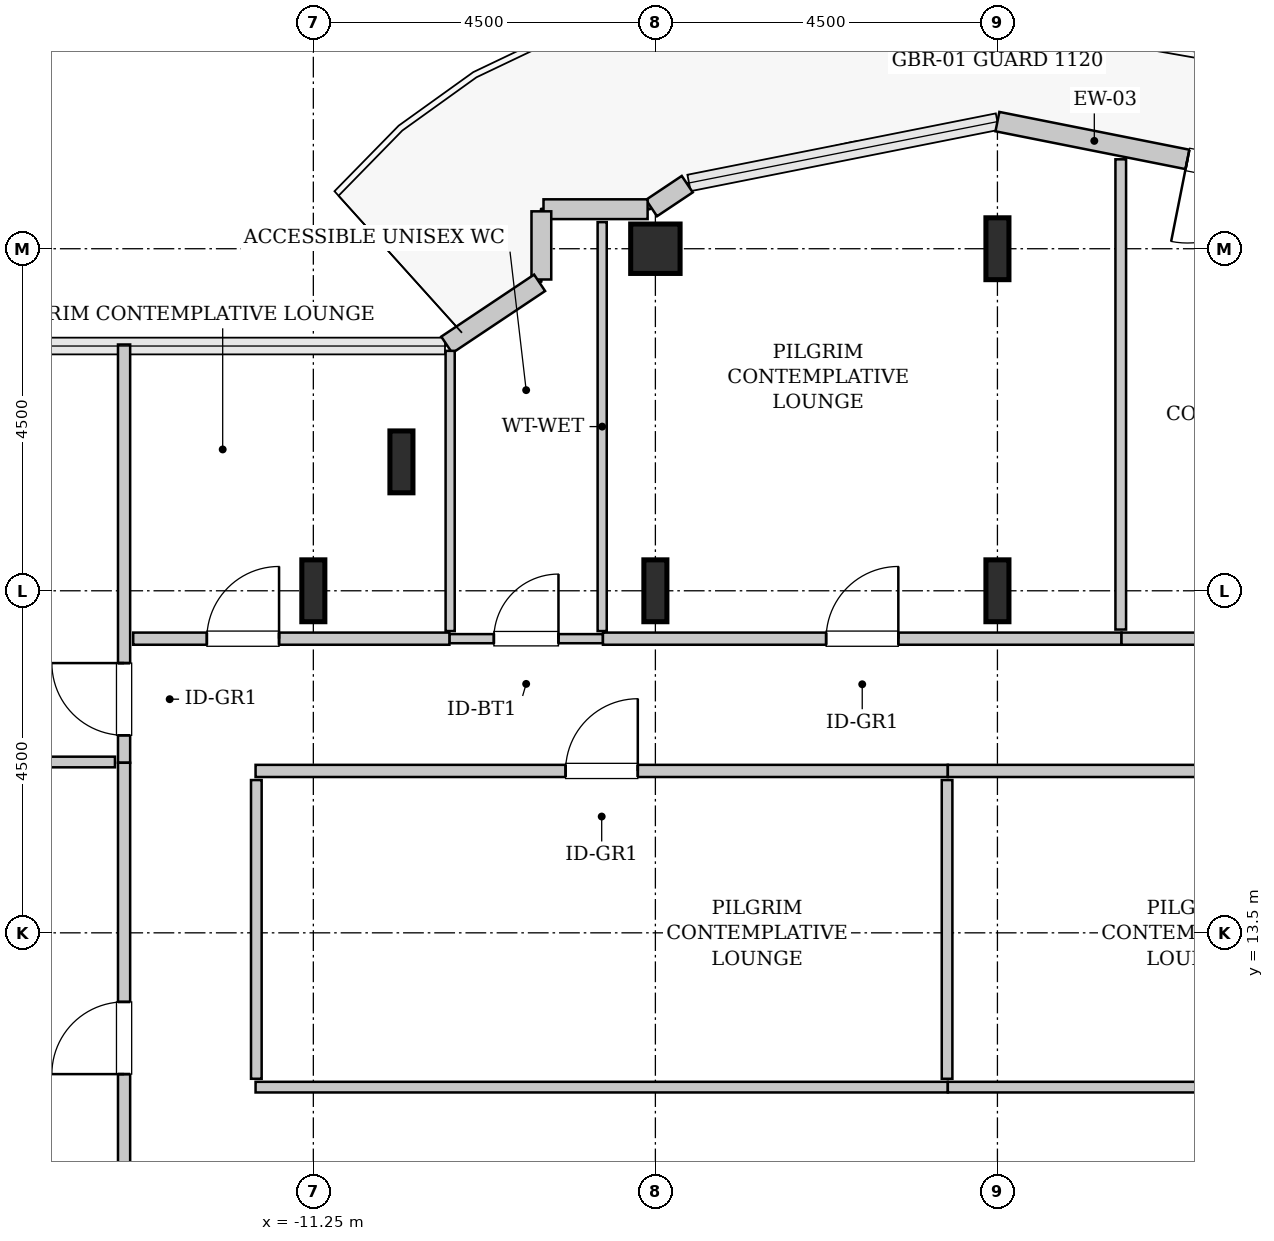
"""IFC4 building model, lengths in metres.
Left out: names, types, materials, properties, quantities, classifications, styles, units other than length and angle.
Written with IfcOpenShell. Run it as: python <this file> out.ifc"""

import sys

from ifc_helpers import new_model, si_unit, direction, frame, frame_2d, origin, origin_2d, place, context, subcontext, project, spatial, rectangle, hollow_rectangle, i_section, extrude, source, transform, mapped, element, fill, save


model = new_model("IFC4")
c1 = context("Model", 3, precision=1e-05, world=origin(), true_north=direction((0.0, 1.0)))
c2 = subcontext(c1, "Body", "Model", "MODEL_VIEW")
j1 = project(units=[si_unit("LENGTHUNIT", "METRE"), si_unit("PLANEANGLEUNIT", "RADIAN")], contexts=[c1])
p1 = place(None, origin())
s1 = spatial("IfcSite", under=j1, at=p1, CompositionType="ELEMENT")
p2 = place(p1, origin())
s2 = spatial("IfcBuilding", under=s1, at=p2, CompositionType="ELEMENT")
p3 = place(p2, frame((0.0, 0.0, 233.2)))
s3 = spatial("IfcBuildingStorey", under=s2, at=p3, CompositionType="ELEMENT", Elevation=233.2)
m1 = source(origin(), c2, "Body", "SweptSolid", [
    extrude(i_section(OverallWidth=0.303, OverallDepth=0.814, WebThickness=0.021, FlangeThickness=0.04, FilletRadius=0.03, at=origin_2d()), origin(), (0.0, 0.0, 1.0), 3.8),
])
for number, where, z_axis, x_axis in (
    (1, (-11.25, 18.0, 0.0), (0.0, 0.0, 1.0), (1.0, 0.0, 0.0)),
    (2, (-10.091, 19.696, 0.0), (0.0, 0.0, 1.0), (1.0, 0.0, 0.0)),
    (3, (-6.75, 18.0, 0.0), (0.0, 0.0, 1.0), (1.0, 0.0, 0.0)),
):
    element("IfcColumn", number, at=place(p3, frame(where, z_axis=z_axis, x_axis=x_axis)), inside=s3, PredefinedType="COLUMN", context=c2, shape_type="MappedRepresentation", body=[
        mapped(m1, transform((0.0, 0.0, 0.0), x_axis=(1.0, 0.0, 0.0), y_axis=(0.0, 1.0, 0.0), z_axis=(0.0, 0.0, 1.0), scale=1.0)),
    ])
m2 = source(origin(), c2, "Body", "SweptSolid", [
    extrude(hollow_rectangle(XDim=0.65, YDim=0.65, WallThickness=0.032, InnerFilletRadius=0.032, OuterFilletRadius=0.064, at=origin_2d()), origin(), (0.0, 0.0, 1.0), 3.8),
])
p4 = place(p3, frame((-6.75, 22.5, 0.0), z_axis=(0.0, 0.0, 1.0), x_axis=(1.0, 0.0, 0.0)))
e4 = element("IfcColumn", 4, at=p4, inside=s3, PredefinedType="COLUMN", context=c2, shape_type="MappedRepresentation", body=[
    mapped(m2, transform((0.0, 0.0, 0.0), x_axis=(1.0, 0.0, 0.0), y_axis=(0.0, 1.0, 0.0), z_axis=(0.0, 0.0, 1.0), scale=1.0)),
])
for number, where, z_axis, x_axis in (
    (5, (-2.25, 18.0, 0.0), (0.0, 0.0, 1.0), (1.0, 0.0, 0.0)),
    (6, (-2.25, 22.5, 0.0), (0.0, 0.0, 1.0), (1.0, 0.0, 0.0)),
):
    element("IfcColumn", number, at=place(p3, frame(where, z_axis=z_axis, x_axis=x_axis)), inside=s3, PredefinedType="COLUMN", context=c2, shape_type="MappedRepresentation", body=[
        mapped(m1, transform((0.0, 0.0, 0.0), x_axis=(1.0, 0.0, 0.0), y_axis=(0.0, 1.0, 0.0), z_axis=(0.0, 0.0, 1.0), scale=1.0)),
    ])
m3 = source(origin(), c2, "Body", "SweptSolid", [
    extrude(rectangle(XDim=4.137, YDim=0.26, at=frame_2d((2.068, 0.0))), origin(), (0.0, 0.0, 1.0), 3.55),
])
p5 = place(p3, frame((1.807, 23.365, 0.0), z_axis=(0.0, 0.0, 1.0), x_axis=(-0.980782170794, 0.195105954428, 0.0)))
e7 = element("IfcWall", 7, at=p5, inside=s3, PredefinedType="SOLIDWALL", context=c2, shape_type="MappedRepresentation", body=[
    mapped(m3, transform((0.0, 0.0, 0.0), x_axis=(1.0, 0.0, 0.0), y_axis=(0.0, 1.0, 0.0), z_axis=(0.0, 0.0, 1.0), scale=1.0)),
])
p6 = place(p5, frame((0.488, 0.0, 0.0)))
e8 = element("IfcOpeningElement", 8, at=p6, cuts=e7, PredefinedType="OPENING", context=c2, shape_type="SweptSolid", body=[
    extrude(rectangle(XDim=1.1, YDim=2.2, at=frame_2d((0.55, 1.1))), frame((0.0, 0.14, 0.0), z_axis=(0.0, -1.0, 0.0), x_axis=(1.0, 0.0, 0.0)), (0.0, 0.0, 1.0), 0.28),
])
m4 = source(origin(), c2, "Body", "SweptSolid", [
    extrude(rectangle(XDim=0.565, YDim=0.26, at=frame_2d((0.283, 0.0))), origin(), (0.0, 0.0, 1.0), 3.55),
])
p7 = place(p3, frame((-6.331, 23.35, 0.0), z_axis=(0.0, 0.0, 1.0), x_axis=(-0.831651492666, -0.555297933317, 0.0)))
e9 = element("IfcWall", 9, at=p7, inside=s3, PredefinedType="SOLIDWALL", context=c2, shape_type="MappedRepresentation", body=[
    mapped(m4, transform((0.0, 0.0, 0.0), x_axis=(1.0, 0.0, 0.0), y_axis=(0.0, 1.0, 0.0), z_axis=(0.0, 0.0, 1.0), scale=1.0)),
])
m5 = source(origin(), c2, "Body", "SweptSolid", [
    extrude(rectangle(XDim=1.37, YDim=0.26, at=frame_2d((0.685, 0.0))), origin(), (0.0, 0.0, 1.0), 3.55),
])
p8 = place(p3, frame((-6.852, 23.02, 0.0), z_axis=(0.0, 0.0, 1.0), x_axis=(-1.0, 0.0, 0.0)))
e10 = element("IfcWall", 10, at=p8, inside=s3, PredefinedType="SOLIDWALL", context=c2, shape_type="MappedRepresentation", body=[
    mapped(m5, transform((0.0, 0.0, 0.0), x_axis=(1.0, 0.0, 0.0), y_axis=(0.0, 1.0, 0.0), z_axis=(0.0, 0.0, 1.0), scale=1.0)),
])
m6 = source(origin(), c2, "Body", "SweptSolid", [
    extrude(rectangle(XDim=0.897, YDim=0.26, at=frame_2d((0.448, 0.0))), origin(), (0.0, 0.0, 1.0), 3.55),
])
p9 = place(p3, frame((-8.25, 22.992, 0.0), z_axis=(0.0, 0.0, 1.0), x_axis=(0.0, -1.0, 0.0)))
e11 = element("IfcWall", 11, at=p9, inside=s3, PredefinedType="SOLIDWALL", context=c2, shape_type="MappedRepresentation", body=[
    mapped(m6, transform((0.0, 0.0, 0.0), x_axis=(1.0, 0.0, 0.0), y_axis=(0.0, 1.0, 0.0), z_axis=(0.0, 0.0, 1.0), scale=1.0)),
])
m7 = source(origin(), c2, "Body", "SweptSolid", [
    extrude(rectangle(XDim=1.469, YDim=0.26, at=frame_2d((0.734, 0.0))), origin(), (0.0, 0.0, 1.0), 3.55),
])
p10 = place(p3, frame((-8.273, 22.052, 0.0), z_axis=(0.0, 0.0, 1.0), x_axis=(-0.831461760506, -0.555581983884, 0.0)))
e12 = element("IfcWall", 12, at=p10, inside=s3, PredefinedType="SOLIDWALL", context=c2, shape_type="MappedRepresentation", body=[
    mapped(m7, transform((0.0, 0.0, 0.0), x_axis=(1.0, 0.0, 0.0), y_axis=(0.0, 1.0, 0.0), z_axis=(0.0, 0.0, 1.0), scale=1.0)),
])
m8 = source(origin(), c2, "Body", "SweptSolid", [
    extrude(rectangle(XDim=2.02, YDim=0.12, at=frame_2d((1.01, 0.0))), origin(), (0.0, 0.0, 1.0), 3.535),
])
p11 = place(p3, frame((-9.46, 17.37, 0.0), z_axis=(0.0, 0.0, 1.0), x_axis=(1.0, 0.0, 0.0)))
e13 = element("IfcWall", 13, at=p11, inside=s3, PredefinedType="PLUMBINGWALL", context=c2, shape_type="MappedRepresentation", body=[
    mapped(m8, transform((0.0, 0.0, 0.0), x_axis=(1.0, 0.0, 0.0), y_axis=(0.0, 1.0, 0.0), z_axis=(0.0, 0.0, 1.0), scale=1.0)),
])
p12 = place(p11, frame((0.585, 0.0, 0.0)))
e14 = element("IfcOpeningElement", 14, at=p12, cuts=e13, PredefinedType="OPENING", context=c2, shape_type="SweptSolid", body=[
    extrude(rectangle(XDim=0.85, YDim=2.1, at=frame_2d((0.425, 1.05))), frame((0.0, 0.07, 0.0), z_axis=(0.0, -1.0, 0.0), x_axis=(1.0, 0.0, 0.0)), (0.0, 0.0, 1.0), 0.14),
])
m9 = source(origin(), c2, "Body", "SweptSolid", [
    extrude(rectangle(XDim=5.38, YDim=0.12, at=frame_2d((2.69, 0.0))), origin(), (0.0, 0.0, 1.0), 3.535),
])
p13 = place(p3, frame((-7.45, 17.47, 0.0), z_axis=(0.0, 0.0, 1.0), x_axis=(0.0, 1.0, 0.0)))
e15 = element("IfcWall", 15, at=p13, inside=s3, PredefinedType="PLUMBINGWALL", context=c2, shape_type="MappedRepresentation", body=[
    mapped(m9, transform((0.0, 0.0, 0.0), x_axis=(1.0, 0.0, 0.0), y_axis=(0.0, 1.0, 0.0), z_axis=(0.0, 0.0, 1.0), scale=1.0)),
])
m10 = source(origin(), c2, "Body", "SweptSolid", [
    extrude(rectangle(XDim=3.687, YDim=0.12, at=frame_2d((1.843, 0.0))), origin(), (0.0, 0.0, 1.0), 3.535),
])
p14 = place(p3, frame((-9.45, 17.47, 0.0), z_axis=(0.0, 0.0, 1.0), x_axis=(0.0, 1.0, 0.0)))
e16 = element("IfcWall", 16, at=p14, inside=s3, PredefinedType="PLUMBINGWALL", context=c2, shape_type="MappedRepresentation", body=[
    mapped(m10, transform((0.0, 0.0, 0.0), x_axis=(1.0, 0.0, 0.0), y_axis=(0.0, 1.0, 0.0), z_axis=(0.0, 0.0, 1.0), scale=1.0)),
])
m11 = source(origin(), c2, "Body", "SweptSolid", [
    extrude(rectangle(XDim=5.502, YDim=0.16, at=frame_2d((2.751, 0.0))), origin(), (0.0, 0.0, 1.0), 3.535),
])
p15 = place(p3, frame((-13.74, 15.738, 0.0), z_axis=(0.0, 0.0, 1.0), x_axis=(0.0, 1.0, 0.0)))
e17 = element("IfcWall", 17, at=p15, inside=s3, PredefinedType="PARTITIONING", context=c2, shape_type="MappedRepresentation", body=[
    mapped(m11, transform((0.0, 0.0, 0.0), x_axis=(1.0, 0.0, 0.0), y_axis=(0.0, 1.0, 0.0), z_axis=(0.0, 0.0, 1.0), scale=1.0)),
])
p16 = place(p15, frame((0.361, 0.0, 0.0)))
e18 = element("IfcOpeningElement", 18, at=p16, cuts=e17, PredefinedType="OPENING", context=c2, shape_type="SweptSolid", body=[
    extrude(rectangle(XDim=0.95, YDim=2.1, at=frame_2d((0.475, 1.05))), frame((0.0, 0.09, 0.0), z_axis=(0.0, -1.0, 0.0), x_axis=(1.0, 0.0, 0.0)), (0.0, 0.0, 1.0), 0.18),
])
m12 = source(origin(), c2, "Body", "SweptSolid", [
    extrude(rectangle(XDim=11.43, YDim=0.14, at=frame_2d((5.715, 0.0))), origin(), (0.0, 0.0, 1.0), 3.535),
])
p17 = place(p3, frame((-25.29, 15.748, 0.0), z_axis=(0.0, 0.0, 1.0), x_axis=(1.0, 0.0, 0.0)))
e19 = element("IfcWall", 19, at=p17, inside=s3, PredefinedType="PARTITIONING", context=c2, shape_type="MappedRepresentation", body=[
    mapped(m12, transform((0.0, 0.0, 0.0), x_axis=(1.0, 0.0, 0.0), y_axis=(0.0, 1.0, 0.0), z_axis=(0.0, 0.0, 1.0), scale=1.0)),
])
m13 = source(origin(), c2, "Body", "SweptSolid", [
    extrude(rectangle(XDim=7.242, YDim=0.16, at=frame_2d((3.621, 0.0))), origin(), (0.0, 0.0, 1.0), 3.535),
])
p18 = place(p3, frame((-13.74, 8.495, 0.0), z_axis=(0.0, 0.0, 1.0), x_axis=(0.0, 1.0, 0.0)))
e20 = element("IfcWall", 20, at=p18, inside=s3, PredefinedType="PARTITIONING", context=c2, shape_type="MappedRepresentation", body=[
    mapped(m13, transform((0.0, 0.0, 0.0), x_axis=(1.0, 0.0, 0.0), y_axis=(0.0, 1.0, 0.0), z_axis=(0.0, 0.0, 1.0), scale=1.0)),
])
p19 = place(p18, frame((3.146, 0.0, 0.0)))
e21 = element("IfcOpeningElement", 21, at=p19, cuts=e20, PredefinedType="OPENING", context=c2, shape_type="SweptSolid", body=[
    extrude(rectangle(XDim=0.95, YDim=2.1, at=frame_2d((0.475, 1.05))), frame((0.0, 0.09, 0.0), z_axis=(0.0, -1.0, 0.0), x_axis=(1.0, 0.0, 0.0)), (0.0, 0.0, 1.0), 0.18),
])
m14 = source(origin(), c2, "Body", "SweptSolid", [
    extrude(rectangle(XDim=9.107, YDim=0.16, at=frame_2d((4.554, 0.0))), origin(), (0.0, 0.0, 1.0), 3.535),
])
p20 = place(p3, frame((-12.01, 15.63, 0.0), z_axis=(0.0, 0.0, 1.0), x_axis=(1.0, 0.0, 0.0)))
e22 = element("IfcWall", 22, at=p20, inside=s3, PredefinedType="PARTITIONING", context=c2, shape_type="MappedRepresentation", body=[
    mapped(m14, transform((0.0, 0.0, 0.0), x_axis=(1.0, 0.0, 0.0), y_axis=(0.0, 1.0, 0.0), z_axis=(0.0, 0.0, 1.0), scale=1.0)),
])
p21 = place(p20, frame((4.079, 0.0, 0.0)))
e23 = element("IfcOpeningElement", 23, at=p21, cuts=e22, PredefinedType="OPENING", context=c2, shape_type="SweptSolid", body=[
    extrude(rectangle(XDim=0.95, YDim=2.1, at=frame_2d((0.475, 1.05))), frame((0.0, 0.09, 0.0), z_axis=(0.0, -1.0, 0.0), x_axis=(1.0, 0.0, 0.0)), (0.0, 0.0, 1.0), 0.18),
])
m15 = source(origin(), c2, "Body", "SweptSolid", [
    extrude(rectangle(XDim=9.107, YDim=0.14, at=frame_2d((4.554, 0.0))), origin(), (0.0, 0.0, 1.0), 3.535),
])
p22 = place(p3, frame((-12.01, 11.47, 0.0), z_axis=(0.0, 0.0, 1.0), x_axis=(1.0, 0.0, 0.0)))
e24 = element("IfcWall", 24, at=p22, inside=s3, PredefinedType="PARTITIONING", context=c2, shape_type="MappedRepresentation", body=[
    mapped(m15, transform((0.0, 0.0, 0.0), x_axis=(1.0, 0.0, 0.0), y_axis=(0.0, 1.0, 0.0), z_axis=(0.0, 0.0, 1.0), scale=1.0)),
])
m16 = source(origin(), c2, "Body", "SweptSolid", [
    extrude(rectangle(XDim=3.93, YDim=0.14, at=frame_2d((1.965, 0.0))), origin(), (0.0, 0.0, 1.0), 3.535),
])
for number, where, z_axis, x_axis in (
    (25, (-12.0, 11.58, 0.0), (0.0, 0.0, 1.0), (0.0, 1.0, 0.0)),
    (26, (-2.913, 11.58, 0.0), (0.0, 0.0, 1.0), (0.0, 1.0, 0.0)),
):
    element("IfcWall", number, at=place(p3, frame(where, z_axis=z_axis, x_axis=x_axis)), inside=s3, PredefinedType="PARTITIONING", context=c2, shape_type="MappedRepresentation", body=[
        mapped(m16, transform((0.0, 0.0, 0.0), x_axis=(1.0, 0.0, 0.0), y_axis=(0.0, 1.0, 0.0), z_axis=(0.0, 0.0, 1.0), scale=1.0)),
    ])
m17 = source(origin(), c2, "Body", "SweptSolid", [
    extrude(rectangle(XDim=9.108, YDim=0.16, at=frame_2d((4.554, 0.0))), origin(), (0.0, 0.0, 1.0), 3.535),
])
p23 = place(p3, frame((-2.903, 15.63, 0.0), z_axis=(0.0, 0.0, 1.0), x_axis=(1.0, 0.0, 0.0)))
e27 = element("IfcWall", 27, at=p23, inside=s3, PredefinedType="PARTITIONING", context=c2, shape_type="MappedRepresentation", body=[
    mapped(m17, transform((0.0, 0.0, 0.0), x_axis=(1.0, 0.0, 0.0), y_axis=(0.0, 1.0, 0.0), z_axis=(0.0, 0.0, 1.0), scale=1.0)),
])
p24 = place(p23, frame((4.079, 0.0, 0.0)))
e28 = element("IfcOpeningElement", 28, at=p24, cuts=e27, PredefinedType="OPENING", context=c2, shape_type="SweptSolid", body=[
    extrude(rectangle(XDim=0.95, YDim=2.1, at=frame_2d((0.475, 1.05))), frame((0.0, 0.09, 0.0), z_axis=(0.0, -1.0, 0.0), x_axis=(1.0, 0.0, 0.0)), (0.0, 0.0, 1.0), 0.18),
])
m18 = source(origin(), c2, "Body", "SweptSolid", [
    extrude(rectangle(XDim=9.108, YDim=0.14, at=frame_2d((4.554, 0.0))), origin(), (0.0, 0.0, 1.0), 3.535),
])
p25 = place(p3, frame((-2.903, 11.47, 0.0), z_axis=(0.0, 0.0, 1.0), x_axis=(1.0, 0.0, 0.0)))
e29 = element("IfcWall", 29, at=p25, inside=s3, PredefinedType="PARTITIONING", context=c2, shape_type="MappedRepresentation", body=[
    mapped(m18, transform((0.0, 0.0, 0.0), x_axis=(1.0, 0.0, 0.0), y_axis=(0.0, 1.0, 0.0), z_axis=(0.0, 0.0, 1.0), scale=1.0)),
])
m19 = source(origin(), c2, "Body", "SweptSolid", [
    extrude(rectangle(XDim=6.823, YDim=0.16, at=frame_2d((3.411, 0.0))), origin(), (0.0, 0.0, 1.0), 3.535),
])
p26 = place(p3, frame((-7.44, 17.37, 0.0), z_axis=(0.0, 0.0, 1.0), x_axis=(1.0, 0.0, 0.0)))
e30 = element("IfcWall", 30, at=p26, inside=s3, PredefinedType="PARTITIONING", context=c2, shape_type="MappedRepresentation", body=[
    mapped(m19, transform((0.0, 0.0, 0.0), x_axis=(1.0, 0.0, 0.0), y_axis=(0.0, 1.0, 0.0), z_axis=(0.0, 0.0, 1.0), scale=1.0)),
])
p27 = place(p26, frame((2.936, 0.0, 0.0)))
e31 = element("IfcOpeningElement", 31, at=p27, cuts=e30, PredefinedType="OPENING", context=c2, shape_type="SweptSolid", body=[
    extrude(rectangle(XDim=0.95, YDim=2.1, at=frame_2d((0.475, 1.05))), frame((0.0, 0.09, 0.0), z_axis=(0.0, -1.0, 0.0), x_axis=(1.0, 0.0, 0.0)), (0.0, 0.0, 1.0), 0.18),
])
m20 = source(origin(), c2, "Body", "SweptSolid", [
    extrude(rectangle(XDim=6.187, YDim=0.14, at=frame_2d((3.093, 0.0))), origin(), (0.0, 0.0, 1.0), 3.535),
])
p28 = place(p3, frame((-0.627, 17.49, 0.0), z_axis=(0.0, 0.0, 1.0), x_axis=(0.0, 1.0, 0.0)))
e32 = element("IfcWall", 32, at=p28, inside=s3, PredefinedType="PARTITIONING", context=c2, shape_type="MappedRepresentation", body=[
    mapped(m20, transform((0.0, 0.0, 0.0), x_axis=(1.0, 0.0, 0.0), y_axis=(0.0, 1.0, 0.0), z_axis=(0.0, 0.0, 1.0), scale=1.0)),
])
p29 = place(p3, frame((-0.617, 17.37, 0.0), z_axis=(0.0, 0.0, 1.0), x_axis=(1.0, 0.0, 0.0)))
e33 = element("IfcWall", 33, at=p29, inside=s3, PredefinedType="PARTITIONING", context=c2, shape_type="MappedRepresentation", body=[
    mapped(m19, transform((0.0, 0.0, 0.0), x_axis=(1.0, 0.0, 0.0), y_axis=(0.0, 1.0, 0.0), z_axis=(0.0, 0.0, 1.0), scale=1.0)),
])
p30 = place(p29, frame((3.361, 0.0, 0.0)))
e34 = element("IfcOpeningElement", 34, at=p30, cuts=e33, PredefinedType="OPENING", context=c2, shape_type="SweptSolid", body=[
    extrude(rectangle(XDim=0.95, YDim=2.1, at=frame_2d((0.475, 1.05))), frame((0.0, 0.09, 0.0), z_axis=(0.0, -1.0, 0.0), x_axis=(1.0, 0.0, 0.0)), (0.0, 0.0, 1.0), 0.18),
])
m21 = source(origin(), c2, "Body", "SweptSolid", [
    extrude(rectangle(XDim=4.16, YDim=0.16, at=frame_2d((2.08, 0.0))), origin(), (0.0, 0.0, 1.0), 3.535),
])
p31 = place(p3, frame((-13.62, 17.37, 0.0), z_axis=(0.0, 0.0, 1.0), x_axis=(1.0, 0.0, 0.0)))
e35 = element("IfcWall", 35, at=p31, inside=s3, PredefinedType="PARTITIONING", context=c2, shape_type="MappedRepresentation", body=[
    mapped(m21, transform((0.0, 0.0, 0.0), x_axis=(1.0, 0.0, 0.0), y_axis=(0.0, 1.0, 0.0), z_axis=(0.0, 0.0, 1.0), scale=1.0)),
])
p32 = place(p31, frame((0.969, 0.0, 0.0)))
e36 = element("IfcOpeningElement", 36, at=p32, cuts=e35, PredefinedType="OPENING", context=c2, shape_type="SweptSolid", body=[
    extrude(rectangle(XDim=0.95, YDim=2.1, at=frame_2d((0.475, 1.05))), frame((0.0, 0.09, 0.0), z_axis=(0.0, -1.0, 0.0), x_axis=(1.0, 0.0, 0.0)), (0.0, 0.0, 1.0), 0.18),
])
m22 = source(origin(), c2, "Body", "SweptSolid", [
    extrude(rectangle(XDim=1.1, YDim=2.2, at=frame_2d((0.55, 1.1))), frame((0.0, 0.025, 0.0), z_axis=(0.0, -1.0, 0.0), x_axis=(1.0, 0.0, 0.0)), (0.0, 0.0, 1.0), 0.05),
])
p33 = place(p6, origin())
e37 = element("IfcDoor", 37, at=p33, inside=s3, OperationType="SINGLE_SWING_RIGHT", PredefinedType="DOOR", context=c2, shape_type="MappedRepresentation", body=[
    mapped(m22, transform((0.0, 0.0, 0.0), x_axis=(1.0, 0.0, 0.0), y_axis=(0.0, 1.0, 0.0), z_axis=(0.0, 0.0, 1.0), scale=1.0)),
])
fill(e8, e37)
m23 = source(origin(), c2, "Body", "SweptSolid", [
    extrude(rectangle(XDim=0.85, YDim=2.1, at=frame_2d((0.425, 1.05))), frame((0.0, 0.025, 0.0), z_axis=(0.0, -1.0, 0.0), x_axis=(1.0, 0.0, 0.0)), (0.0, 0.0, 1.0), 0.05),
])
p34 = place(p12, origin())
e38 = element("IfcDoor", 38, at=p34, inside=s3, OperationType="SINGLE_SWING_RIGHT", PredefinedType="DOOR", context=c2, shape_type="MappedRepresentation", body=[
    mapped(m23, transform((0.0, 0.0, 0.0), x_axis=(1.0, 0.0, 0.0), y_axis=(0.0, 1.0, 0.0), z_axis=(0.0, 0.0, 1.0), scale=1.0)),
])
fill(e14, e38)
m24 = source(origin(), c2, "Body", "SweptSolid", [
    extrude(rectangle(XDim=0.95, YDim=2.1, at=frame_2d((0.475, 1.05))), frame((0.0, 0.025, 0.0), z_axis=(0.0, -1.0, 0.0), x_axis=(1.0, 0.0, 0.0)), (0.0, 0.0, 1.0), 0.05),
])
p35 = place(p16, origin())
e39 = element("IfcDoor", 39, at=p35, inside=s3, OperationType="SINGLE_SWING_RIGHT", PredefinedType="DOOR", context=c2, shape_type="MappedRepresentation", body=[
    mapped(m24, transform((0.0, 0.0, 0.0), x_axis=(1.0, 0.0, 0.0), y_axis=(0.0, 1.0, 0.0), z_axis=(0.0, 0.0, 1.0), scale=1.0)),
])
fill(e18, e39)
p36 = place(p19, origin())
e40 = element("IfcDoor", 40, at=p36, inside=s3, OperationType="SINGLE_SWING_LEFT", PredefinedType="DOOR", context=c2, shape_type="MappedRepresentation", body=[
    mapped(m24, transform((0.0, 0.0, 0.0), x_axis=(1.0, 0.0, 0.0), y_axis=(0.0, 1.0, 0.0), z_axis=(0.0, 0.0, 1.0), scale=1.0)),
])
fill(e21, e40)
p37 = place(p21, origin())
e41 = element("IfcDoor", 41, at=p37, inside=s3, OperationType="SINGLE_SWING_RIGHT", PredefinedType="DOOR", context=c2, shape_type="MappedRepresentation", body=[
    mapped(m24, transform((0.0, 0.0, 0.0), x_axis=(1.0, 0.0, 0.0), y_axis=(0.0, 1.0, 0.0), z_axis=(0.0, 0.0, 1.0), scale=1.0)),
])
fill(e23, e41)
p38 = place(p27, origin())
e42 = element("IfcDoor", 42, at=p38, inside=s3, OperationType="SINGLE_SWING_RIGHT", PredefinedType="DOOR", context=c2, shape_type="MappedRepresentation", body=[
    mapped(m24, transform((0.0, 0.0, 0.0), x_axis=(1.0, 0.0, 0.0), y_axis=(0.0, 1.0, 0.0), z_axis=(0.0, 0.0, 1.0), scale=1.0)),
])
fill(e31, e42)
p39 = place(p32, origin())
e43 = element("IfcDoor", 43, at=p39, inside=s3, OperationType="SINGLE_SWING_RIGHT", PredefinedType="DOOR", context=c2, shape_type="MappedRepresentation", body=[
    mapped(m24, transform((0.0, 0.0, 0.0), x_axis=(1.0, 0.0, 0.0), y_axis=(0.0, 1.0, 0.0), z_axis=(0.0, 0.0, 1.0), scale=1.0)),
])
fill(e36, e43)
save(model, sys.argv[1])
